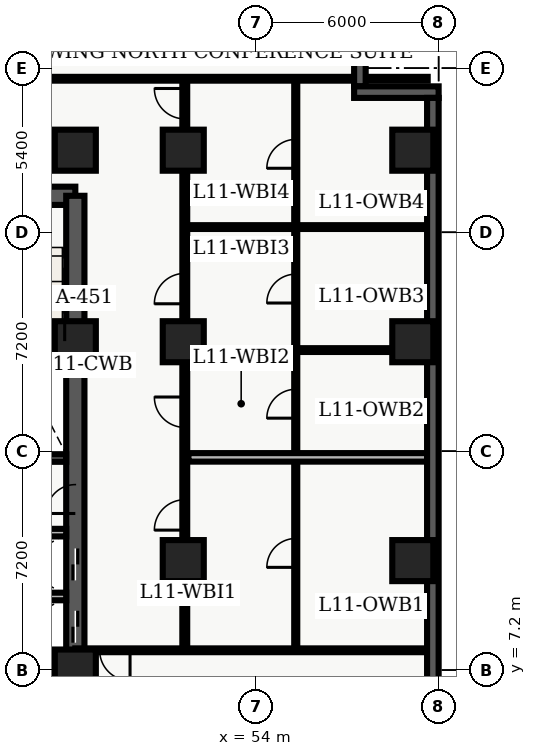
"""IFC4 building model, lengths in metres.
Left out: names, types, materials, properties, quantities, classifications, styles, units other than length and angle.
Written with IfcOpenShell. Run it as: python <this file> out.ifc"""

import sys

from ifc_helpers import new_model, entity, si_unit, converted_unit, direction, frame, origin_with_axes, origin_2d_with_axis, place, context, subcontext, project, spatial, polyline, rectangle, outline, extrude, element, fill, save


model = new_model("IFC4")
c1 = context("Model", 3, precision=1e-05, world=origin_with_axes(), true_north=direction((0.0, 1.0)))
c2 = subcontext(c1, "Body", "Model", "MODEL_VIEW")
j1 = project(units=[si_unit("LENGTHUNIT", "METRE"), converted_unit("PLANEANGLEUNIT", "DEGREE", entity("IfcPlaneAngleMeasure", 0.017), si_unit("PLANEANGLEUNIT", "RADIAN"), dimensions=[0, 0, 0, 0, 0, 0, 0])], contexts=[c1])
p1 = place(None, origin_with_axes())
s1 = spatial("IfcSite", under=j1, at=p1, CompositionType="ELEMENT")
p2 = place(p1, origin_with_axes())
s2 = spatial("IfcBuilding", under=s1, at=p2, CompositionType="ELEMENT")
p3 = place(p2, frame((0.0, 0.0, 48.3), z_axis=(0.0, 0.0, 1.0), x_axis=(1.0, 0.0, 0.0)))
s3 = spatial("IfcBuildingStorey", under=s2, at=p3, CompositionType="ELEMENT", Elevation=48.3)
p4 = place(p3, frame((40.2, 7.2, 0.0), z_axis=(0.0, 0.0, 1.0), x_axis=(1.0, 0.0, 0.0)))
e1 = element("IfcWall", 1, at=p4, inside=s3, PredefinedType="SHEAR", context=c2, shape_type="SweptSolid", body=[
    extrude(outline(polyline([(0.0, -0.3), (7.85, -0.3), (7.85, 0.3), (0.0, 0.3), (0.0, -0.3)])), origin_with_axes(), (0.0, 0.0, 1.0), 3.66),
])
p5 = place(p4, frame((2.175, 0.0, 0.0), z_axis=(0.0, 0.0, 1.0), x_axis=(1.0, 0.0, 0.0)))
e2 = element("IfcOpeningElement", 2, at=p5, cuts=e1, PredefinedType="OPENING", context=c2, shape_type="SweptSolid", body=[
    extrude(rectangle(XDim=1.05, YDim=0.62, at=origin_2d_with_axis()), origin_with_axes(), (0.0, 0.0, 1.0), 2.15),
])
p6 = place(p3, frame((40.2, 22.8, 0.0), z_axis=(0.0, 0.0, 1.0), x_axis=(1.0, 0.0, 0.0)))
e3 = element("IfcWall", 3, at=p6, inside=s3, PredefinedType="SHEAR", context=c2, shape_type="SweptSolid", body=[
    extrude(outline(polyline([(0.0, -0.3), (7.85, -0.3), (7.85, 0.3), (0.0, 0.3), (0.0, -0.3)])), origin_with_axes(), (0.0, 0.0, 1.0), 3.66),
])
p7 = place(p6, frame((5.775, 0.0, 0.0), z_axis=(0.0, 0.0, 1.0), x_axis=(1.0, 0.0, 0.0)))
e4 = element("IfcOpeningElement", 4, at=p7, cuts=e3, PredefinedType="OPENING", context=c2, shape_type="SweptSolid", body=[
    extrude(rectangle(XDim=1.05, YDim=0.62, at=origin_2d_with_axis()), origin_with_axes(), (0.0, 0.0, 1.0), 2.15),
])
p8 = place(p6, frame((2.15, 0.0, 0.0), z_axis=(0.0, 0.0, 1.0), x_axis=(1.0, 0.0, 0.0)))
e5 = element("IfcOpeningElement", 5, at=p8, cuts=e3, PredefinedType="OPENING", context=c2, shape_type="SweptSolid", body=[
    extrude(rectangle(XDim=0.9, YDim=0.62, at=origin_2d_with_axis()), origin_with_axes(), (0.0, 0.0, 1.0), 2.15),
])
p9 = place(p3, frame((48.05, 7.2, 0.0), z_axis=(0.0, 0.0, 1.0), x_axis=(0.0, 1.0, 0.0)))
e6 = element("IfcWall", 6, at=p9, inside=s3, PredefinedType="SHEAR", context=c2, shape_type="SweptSolid", body=[
    extrude(outline(polyline([(0.0, -0.3), (15.6, -0.3), (15.6, 0.3), (0.0, 0.3), (0.0, -0.3)])), origin_with_axes(), (0.0, 0.0, 1.0), 3.66),
])
p10 = place(p9, frame((1.425, 0.0, 0.0), z_axis=(0.0, 0.0, 1.0), x_axis=(1.0, 0.0, 0.0)))
e7 = element("IfcOpeningElement", 7, at=p10, cuts=e6, PredefinedType="OPENING", context=c2, shape_type="SweptSolid", body=[
    extrude(rectangle(XDim=1.05, YDim=0.62, at=origin_2d_with_axis()), origin_with_axes(), (0.0, 0.0, 1.0), 2.15),
])
p11 = place(p9, frame((3.475, 0.0, 0.0), z_axis=(0.0, 0.0, 1.0), x_axis=(1.0, 0.0, 0.0)))
e8 = element("IfcOpeningElement", 8, at=p11, cuts=e6, PredefinedType="OPENING", context=c2, shape_type="SweptSolid", body=[
    extrude(rectangle(XDim=1.05, YDim=0.62, at=origin_2d_with_axis()), origin_with_axes(), (0.0, 0.0, 1.0), 2.15),
])
p12 = place(p9, frame((5.625, 0.0, 0.0), z_axis=(0.0, 0.0, 1.0), x_axis=(1.0, 0.0, 0.0)))
e9 = element("IfcOpeningElement", 9, at=p12, cuts=e6, PredefinedType="OPENING", context=c2, shape_type="SweptSolid", body=[
    extrude(rectangle(XDim=0.95, YDim=0.62, at=origin_2d_with_axis()), origin_with_axes(), (0.0, 0.0, 1.0), 2.15),
])
p13 = place(p3, frame((44.25, 14.175, 0.0), z_axis=(0.0, 0.0, 1.0), x_axis=(1.0, 0.0, 0.0)))
e10 = element("IfcWall", 10, at=p13, inside=s3, PredefinedType="SHEAR", context=c2, shape_type="SweptSolid", body=[
    extrude(outline(polyline([(0.0, -0.125), (3.5, -0.125), (3.5, 0.125), (0.0, 0.125), (0.0, -0.125)])), origin_with_axes(), (0.0, 0.0, 1.0), 3.66),
])
for number, where, z_axis, x_axis in (
    (11, (48.05, 7.2, 0.0), (0.0, 0.0, 1.0), (1.0, 0.0, 0.0)),
    (12, (48.05, 18.0, 0.0), (0.0, 0.0, 1.0), (1.0, 0.0, 0.0)),
    (13, (48.05, 24.3, 0.0), (0.0, 0.0, 1.0), (1.0, 0.0, 0.0)),
    (14, (51.6, 10.8, 0.0), (0.0, 0.0, 1.0), (1.0, 0.0, 0.0)),
    (15, (51.6, 18.0, 0.0), (0.0, 0.0, 1.0), (1.0, 0.0, 0.0)),
    (16, (51.6, 24.3, 0.0), (0.0, 0.0, 1.0), (1.0, 0.0, 0.0)),
    (17, (59.15, 10.8, 0.0), (0.0, 0.0, 1.0), (1.0, 0.0, 0.0)),
    (18, (59.15, 18.0, 0.0), (0.0, 0.0, 1.0), (1.0, 0.0, 0.0)),
    (19, (59.15, 24.3, 0.0), (0.0, 0.0, 1.0), (1.0, 0.0, 0.0)),
):
    element("IfcColumn", number, at=place(p3, frame(where, z_axis=z_axis, x_axis=x_axis)), inside=s3, PredefinedType="COLUMN", context=c2, shape_type="SweptSolid", body=[
        extrude(rectangle(XDim=1.35, YDim=1.35, at=origin_2d_with_axis()), origin_with_axes(), (0.0, 0.0, 1.0), 3.9),
    ])
for number, where, z_axis, x_axis in (
    (20, (44.25, 9.62, 0.0), (0.0, 0.0, 1.0), (1.0, 0.0, 0.0)),
    (21, (44.25, 11.72, 0.0), (0.0, 0.0, 1.0), (1.0, 0.0, 0.0)),
):
    element("IfcWall", number, at=place(p3, frame(where, z_axis=z_axis, x_axis=x_axis)), inside=s3, PredefinedType="SOLIDWALL", context=c2, shape_type="SweptSolid", body=[
        extrude(outline(polyline([(0.0, -0.125), (3.5, -0.125), (3.5, 0.125), (0.0, 0.125), (0.0, -0.125)])), origin_with_axes(), (0.0, 0.0, 1.0), 2.7),
    ])
p14 = place(p3, frame((51.65, 7.85, 0.0), z_axis=(0.0, 0.0, 1.0), x_axis=(0.0, 1.0, 0.0)))
e22 = element("IfcWall", 22, at=p14, inside=s3, PredefinedType="PARTITIONING", context=c2, shape_type="SweptSolid", body=[
    extrude(outline(polyline([(0.0, -0.08), (18.8, -0.08), (18.8, 0.08), (0.0, 0.08), (0.0, -0.08)])), origin_with_axes(), (0.0, 0.0, 1.0), 2.7),
])
p15 = place(p14, frame((4.453, 0.0, 0.0), z_axis=(0.0, 0.0, 1.0), x_axis=(1.0, 0.0, 0.0)))
e23 = element("IfcOpeningElement", 23, at=p15, cuts=e22, PredefinedType="OPENING", context=c2, shape_type="SweptSolid", body=[
    extrude(rectangle(XDim=1.0, YDim=0.18, at=origin_2d_with_axis()), origin_with_axes(), (0.0, 0.0, 1.0), 2.15),
])
p16 = place(p14, frame((7.831, 0.0, 0.0), z_axis=(0.0, 0.0, 1.0), x_axis=(1.0, 0.0, 0.0)))
e24 = element("IfcOpeningElement", 24, at=p16, cuts=e22, PredefinedType="OPENING", context=c2, shape_type="SweptSolid", body=[
    extrude(rectangle(XDim=1.0, YDim=0.18, at=origin_2d_with_axis()), origin_with_axes(), (0.0, 0.0, 1.0), 2.15),
])
p17 = place(p14, frame((11.898, 0.0, 0.0), z_axis=(0.0, 0.0, 1.0), x_axis=(1.0, 0.0, 0.0)))
e25 = element("IfcOpeningElement", 25, at=p17, cuts=e22, PredefinedType="OPENING", context=c2, shape_type="SweptSolid", body=[
    extrude(rectangle(XDim=1.0, YDim=0.18, at=origin_2d_with_axis()), origin_with_axes(), (0.0, 0.0, 1.0), 2.15),
])
p18 = place(p14, frame((17.98, 0.0, 0.0), z_axis=(0.0, 0.0, 1.0), x_axis=(1.0, 0.0, 0.0)))
e26 = element("IfcOpeningElement", 26, at=p18, cuts=e22, PredefinedType="OPENING", context=c2, shape_type="SweptSolid", body=[
    extrude(rectangle(XDim=1.0, YDim=0.18, at=origin_2d_with_axis()), origin_with_axes(), (0.0, 0.0, 1.0), 2.15),
])
p19 = place(p3, frame((59.64, 7.85, 0.0), z_axis=(0.0, 0.0, 1.0), x_axis=(-1.0, 0.0, 0.0)))
e27 = element("IfcWall", 27, at=p19, inside=s3, PredefinedType="PARTITIONING", context=c2, shape_type="SweptSolid", body=[
    extrude(outline(polyline([(0.0, -0.062), (11.59, -0.062), (11.59, 0.062), (0.0, 0.062), (0.0, -0.062)])), origin_with_axes(), (0.0, 0.0, 1.0), 2.7),
])
p20 = place(p19, frame((10.29, 0.0, 0.0), z_axis=(0.0, 0.0, 1.0), x_axis=(1.0, 0.0, 0.0)))
e28 = element("IfcOpeningElement", 28, at=p20, cuts=e27, PredefinedType="OPENING", context=c2, shape_type="SweptSolid", body=[
    extrude(rectangle(XDim=1.0, YDim=0.145, at=origin_2d_with_axis()), origin_with_axes(), (0.0, 0.0, 1.0), 2.15),
])
p21 = place(p3, frame((38.76, 26.65, 0.0), z_axis=(0.0, 0.0, 1.0), x_axis=(1.0, 0.0, 0.0)))
e29 = element("IfcWall", 29, at=p21, inside=s3, PredefinedType="PARTITIONING", context=c2, shape_type="SweptSolid", body=[
    extrude(outline(polyline([(0.0, -0.062), (20.88, -0.062), (20.88, 0.062), (0.0, 0.062), (0.0, -0.062)])), origin_with_axes(), (0.0, 0.0, 1.0), 2.7),
])
p22 = place(p21, frame((4.24, 0.0, 0.0), z_axis=(0.0, 0.0, 1.0), x_axis=(1.0, 0.0, 0.0)))
e30 = element("IfcOpeningElement", 30, at=p22, cuts=e29, PredefinedType="OPENING", context=c2, shape_type="SweptSolid", body=[
    extrude(rectangle(XDim=1.0, YDim=0.145, at=origin_2d_with_axis()), origin_with_axes(), (0.0, 0.0, 1.0), 2.15),
])
p23 = place(p3, frame((55.3, 7.98, 0.0), z_axis=(0.0, 0.0, 1.0), x_axis=(0.0, 1.0, 0.0)))
e31 = element("IfcWall", 31, at=p23, inside=s3, PredefinedType="PARTITIONING", context=c2, shape_type="SweptSolid", body=[
    extrude(outline(polyline([(0.0, -0.05), (18.54, -0.05), (18.54, 0.05), (0.0, 0.05), (0.0, -0.05)])), origin_with_axes(), (0.0, 0.0, 1.0), 2.7),
])
p24 = place(p23, frame((3.073, 0.0, 0.0), z_axis=(0.0, 0.0, 1.0), x_axis=(1.0, 0.0, 0.0)))
e32 = element("IfcOpeningElement", 32, at=p24, cuts=e31, PredefinedType="OPENING", context=c2, shape_type="SweptSolid", body=[
    extrude(rectangle(XDim=0.95, YDim=0.12, at=origin_2d_with_axis()), origin_with_axes(), (0.0, 0.0, 1.0), 2.15),
])
p25 = place(p23, frame((7.981, 0.0, 0.0), z_axis=(0.0, 0.0, 1.0), x_axis=(1.0, 0.0, 0.0)))
e33 = element("IfcOpeningElement", 33, at=p25, cuts=e31, PredefinedType="OPENING", context=c2, shape_type="SweptSolid", body=[
    extrude(rectangle(XDim=0.95, YDim=0.12, at=origin_2d_with_axis()), origin_with_axes(), (0.0, 0.0, 1.0), 2.15),
])
p26 = place(p23, frame((11.768, 0.0, 0.0), z_axis=(0.0, 0.0, 1.0), x_axis=(1.0, 0.0, 0.0)))
e34 = element("IfcOpeningElement", 34, at=p26, cuts=e31, PredefinedType="OPENING", context=c2, shape_type="SweptSolid", body=[
    extrude(rectangle(XDim=0.95, YDim=0.12, at=origin_2d_with_axis()), origin_with_axes(), (0.0, 0.0, 1.0), 2.15),
])
p27 = place(p23, frame((16.201, 0.0, 0.0), z_axis=(0.0, 0.0, 1.0), x_axis=(1.0, 0.0, 0.0)))
e35 = element("IfcOpeningElement", 35, at=p27, cuts=e31, PredefinedType="OPENING", context=c2, shape_type="SweptSolid", body=[
    extrude(rectangle(XDim=0.95, YDim=0.12, at=origin_2d_with_axis()), origin_with_axes(), (0.0, 0.0, 1.0), 2.15),
])
p28 = place(p3, frame((51.77, 14.196, 0.0), z_axis=(0.0, 0.0, 1.0), x_axis=(1.0, 0.0, 0.0)))
e36 = element("IfcWall", 36, at=p28, inside=s3, PredefinedType="PARTITIONING", context=c2, shape_type="SweptSolid", body=[
    extrude(outline(polyline([(0.0, -0.14), (7.855, -0.14), (7.855, 0.14), (0.0, 0.14), (0.0, -0.14)])), origin_with_axes(), (0.0, 0.0, 1.0), 2.7),
])
for number, where, z_axis, x_axis in (
    (37, (51.77, 17.725, 0.0), (0.0, 0.0, 1.0), (1.0, 0.0, 0.0)),
    (38, (51.77, 21.771, 0.0), (0.0, 0.0, 1.0), (1.0, 0.0, 0.0)),
):
    element("IfcWall", number, at=place(p3, frame(where, z_axis=z_axis, x_axis=x_axis)), inside=s3, PredefinedType="PARTITIONING", context=c2, shape_type="SweptSolid", body=[
        extrude(outline(polyline([(0.0, -0.062), (7.855, -0.062), (7.855, 0.062), (0.0, 0.062), (0.0, -0.062)])), origin_with_axes(), (0.0, 0.0, 1.0), 2.7),
    ])
p29 = place(p3, frame((57.41, 28.42, 0.0), z_axis=(0.0, 0.0, 1.0), x_axis=(0.0, -1.0, 0.0)))
e39 = element("IfcWall", 39, at=p29, inside=s3, PredefinedType="SOLIDWALL", context=c2, shape_type="SweptSolid", body=[
    extrude(outline(polyline([(0.0, -0.19), (2.02, -0.19), (2.02, 0.19), (0.0, 0.19), (0.0, -0.19)])), origin_with_axes(), (0.0, 0.0, 1.0), 3.66),
])
p30 = place(p3, frame((57.22, 26.21, 0.0), z_axis=(0.0, 0.0, 1.0), x_axis=(1.0, 0.0, 0.0)))
e40 = element("IfcWall", 40, at=p30, inside=s3, PredefinedType="SOLIDWALL", context=c2, shape_type="SweptSolid", body=[
    extrude(outline(polyline([(0.0, -0.19), (2.78, -0.19), (2.78, 0.19), (0.0, 0.19), (0.0, -0.19)])), origin_with_axes(), (0.0, 0.0, 1.0), 3.66),
])
p31 = place(p3, frame((59.81, 26.02, 0.0), z_axis=(0.0, 0.0, 1.0), x_axis=(0.0, -1.0, 0.0)))
e41 = element("IfcWall", 41, at=p31, inside=s3, PredefinedType="SOLIDWALL", context=c2, shape_type="SweptSolid", body=[
    extrude(outline(polyline([(0.0, -0.19), (23.62, -0.19), (23.62, 0.19), (0.0, 0.19), (0.0, -0.19)])), origin_with_axes(), (0.0, 0.0, 1.0), 3.66),
])
p32 = place(p31, frame((20.218, 0.0, 0.45), z_axis=(0.0, 0.0, 1.0), x_axis=(1.0, 0.0, 0.0)))
e42 = element("IfcOpeningElement", 42, at=p32, cuts=e41, PredefinedType="OPENING", context=c2, shape_type="SweptSolid", body=[
    extrude(rectangle(XDim=2.1, YDim=0.4, at=origin_2d_with_axis()), origin_with_axes(), (0.0, 0.0, 1.0), 2.2),
])
p33 = place(p9, frame((1.425, 0.0, 0.0), z_axis=(0.0, 0.0, 1.0), x_axis=(1.0, 0.0, 0.0)))
e43 = element("IfcDoor", 43, at=p33, inside=s3, OperationType="SLIDING_TO_LEFT", PredefinedType="DOOR", context=c2, shape_type="SweptSolid", body=[
    extrude(rectangle(XDim=1.05, YDim=0.09, at=origin_2d_with_axis()), origin_with_axes(), (0.0, 0.0, 1.0), 2.15),
])
fill(e7, e43)
p34 = place(p9, frame((3.475, 0.0, 0.0), z_axis=(0.0, 0.0, 1.0), x_axis=(1.0, 0.0, 0.0)))
e44 = element("IfcDoor", 44, at=p34, inside=s3, OperationType="SLIDING_TO_RIGHT", PredefinedType="DOOR", context=c2, shape_type="SweptSolid", body=[
    extrude(rectangle(XDim=1.05, YDim=0.09, at=origin_2d_with_axis()), origin_with_axes(), (0.0, 0.0, 1.0), 2.15),
])
fill(e8, e44)
p35 = place(p9, frame((5.625, 0.0, 0.0), z_axis=(0.0, 0.0, 1.0), x_axis=(1.0, 0.0, 0.0)))
e45 = element("IfcDoor", 45, at=p35, inside=s3, OperationType="SINGLE_SWING_LEFT", PredefinedType="DOOR", context=c2, shape_type="SweptSolid", body=[
    extrude(rectangle(XDim=0.95, YDim=0.09, at=origin_2d_with_axis()), origin_with_axes(), (0.0, 0.0, 1.0), 2.15),
])
fill(e9, e45)
p36 = place(p19, frame((10.29, 0.0, 0.0), z_axis=(0.0, 0.0, 1.0), x_axis=(1.0, 0.0, 0.0)))
e46 = element("IfcDoor", 46, at=p36, inside=s3, OperationType="SINGLE_SWING_LEFT", PredefinedType="DOOR", context=c2, shape_type="SweptSolid", body=[
    extrude(rectangle(XDim=1.0, YDim=0.075, at=origin_2d_with_axis()), origin_with_axes(), (0.0, 0.0, 1.0), 2.15),
])
fill(e28, e46)
p37 = place(p23, frame((3.073, 0.0, 0.0), z_axis=(0.0, 0.0, 1.0), x_axis=(1.0, 0.0, 0.0)))
e47 = element("IfcDoor", 47, at=p37, inside=s3, OperationType="SINGLE_SWING_LEFT", PredefinedType="DOOR", context=c2, shape_type="SweptSolid", body=[
    extrude(rectangle(XDim=0.95, YDim=0.06, at=origin_2d_with_axis()), origin_with_axes(), (0.0, 0.0, 1.0), 2.15),
])
fill(e32, e47)
p38 = place(p14, frame((4.453, 0.0, 0.0), z_axis=(0.0, 0.0, 1.0), x_axis=(1.0, 0.0, 0.0)))
e48 = element("IfcDoor", 48, at=p38, inside=s3, OperationType="SINGLE_SWING_LEFT", PredefinedType="DOOR", context=c2, shape_type="SweptSolid", body=[
    extrude(rectangle(XDim=1.0, YDim=0.09, at=origin_2d_with_axis()), origin_with_axes(), (0.0, 0.0, 1.0), 2.15),
])
fill(e23, e48)
p39 = place(p23, frame((7.981, 0.0, 0.0), z_axis=(0.0, 0.0, 1.0), x_axis=(1.0, 0.0, 0.0)))
e49 = element("IfcDoor", 49, at=p39, inside=s3, OperationType="SINGLE_SWING_LEFT", PredefinedType="DOOR", context=c2, shape_type="SweptSolid", body=[
    extrude(rectangle(XDim=0.95, YDim=0.06, at=origin_2d_with_axis()), origin_with_axes(), (0.0, 0.0, 1.0), 2.15),
])
fill(e33, e49)
p40 = place(p14, frame((7.831, 0.0, 0.0), z_axis=(0.0, 0.0, 1.0), x_axis=(1.0, 0.0, 0.0)))
e50 = element("IfcDoor", 50, at=p40, inside=s3, OperationType="SINGLE_SWING_RIGHT", PredefinedType="DOOR", context=c2, shape_type="SweptSolid", body=[
    extrude(rectangle(XDim=1.0, YDim=0.09, at=origin_2d_with_axis()), origin_with_axes(), (0.0, 0.0, 1.0), 2.15),
])
fill(e24, e50)
p41 = place(p23, frame((11.768, 0.0, 0.0), z_axis=(0.0, 0.0, 1.0), x_axis=(1.0, 0.0, 0.0)))
e51 = element("IfcDoor", 51, at=p41, inside=s3, OperationType="SINGLE_SWING_LEFT", PredefinedType="DOOR", context=c2, shape_type="SweptSolid", body=[
    extrude(rectangle(XDim=0.95, YDim=0.06, at=origin_2d_with_axis()), origin_with_axes(), (0.0, 0.0, 1.0), 2.15),
])
fill(e34, e51)
p42 = place(p14, frame((11.898, 0.0, 0.0), z_axis=(0.0, 0.0, 1.0), x_axis=(1.0, 0.0, 0.0)))
e52 = element("IfcDoor", 52, at=p42, inside=s3, OperationType="SINGLE_SWING_LEFT", PredefinedType="DOOR", context=c2, shape_type="SweptSolid", body=[
    extrude(rectangle(XDim=1.0, YDim=0.09, at=origin_2d_with_axis()), origin_with_axes(), (0.0, 0.0, 1.0), 2.15),
])
fill(e25, e52)
p43 = place(p23, frame((16.201, 0.0, 0.0), z_axis=(0.0, 0.0, 1.0), x_axis=(1.0, 0.0, 0.0)))
e53 = element("IfcDoor", 53, at=p43, inside=s3, OperationType="SINGLE_SWING_LEFT", PredefinedType="DOOR", context=c2, shape_type="SweptSolid", body=[
    extrude(rectangle(XDim=0.95, YDim=0.06, at=origin_2d_with_axis()), origin_with_axes(), (0.0, 0.0, 1.0), 2.15),
])
fill(e35, e53)
p44 = place(p14, frame((17.98, 0.0, 0.0), z_axis=(0.0, 0.0, 1.0), x_axis=(1.0, 0.0, 0.0)))
e54 = element("IfcDoor", 54, at=p44, inside=s3, OperationType="SINGLE_SWING_RIGHT", PredefinedType="DOOR", context=c2, shape_type="SweptSolid", body=[
    extrude(rectangle(XDim=1.0, YDim=0.09, at=origin_2d_with_axis()), origin_with_axes(), (0.0, 0.0, 1.0), 2.15),
])
fill(e26, e54)
save(model, sys.argv[1])
